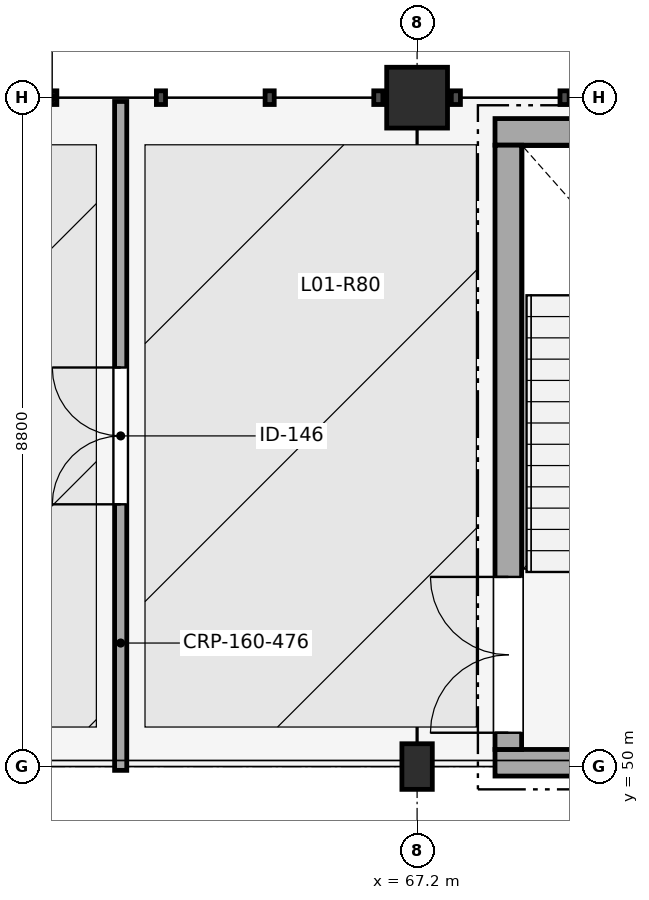
"""IFC4 building model, lengths in metres.
Left out: names, types, materials, properties, quantities, classifications, styles, units other than length and angle.
Written with IfcOpenShell. Run it as: python <this file> out.ifc"""

import sys

from ifc_helpers import new_model, si_unit, direction, frame, frame_2d, origin, origin_2d, place, context, subcontext, project, spatial, rectangle, extrude, element, fill, save


model = new_model("IFC4")
c1 = context("Model", 3, precision=1e-05, world=origin(), true_north=direction((0.0, 1.0)))
c2 = subcontext(c1, "Body", "Model", "MODEL_VIEW")
j1 = project(units=[si_unit("LENGTHUNIT", "METRE"), si_unit("PLANEANGLEUNIT", "RADIAN")], contexts=[c1])
p1 = place(None, origin())
s1 = spatial("IfcSite", under=j1, at=p1, CompositionType="ELEMENT")
p2 = place(p1, origin())
s2 = spatial("IfcBuilding", under=s1, at=p2, CompositionType="ELEMENT")
p3 = place(p2, frame((0.0, 0.0, 4.8)))
s3 = spatial("IfcBuildingStorey", under=s2, at=p3, CompositionType="ELEMENT", Elevation=4.8)
p4 = place(p3, frame((67.2, 50.0, 0.0), z_axis=(0.0, 0.0, 1.0), x_axis=(1.0, 0.0, 0.0)))
e1 = element("IfcColumn", 1, at=p4, inside=s3, PredefinedType="COLUMN", context=c2, shape_type="SweptSolid", body=[
    extrude(rectangle(XDim=0.4, YDim=0.6, at=origin_2d()), origin(), (0.0, 0.0, 1.0), 4.8),
])
p5 = place(p3, frame((67.2, 58.8, 0.0), z_axis=(0.0, 0.0, 1.0), x_axis=(1.0, 0.0, 0.0)))
e2 = element("IfcColumn", 2, at=p5, inside=s3, PredefinedType="COLUMN", context=c2, shape_type="SweptSolid", body=[
    extrude(rectangle(XDim=0.8, YDim=0.8, at=origin_2d()), origin(), (0.0, 0.0, 1.0), 4.8),
])
for number, where, z_axis, x_axis in (
    (3, (73.875, 50.05, 0.0), (0.0, 0.0, 1.0), (-1.0, 0.0, 0.0)),
    (4, (68.225, 58.35, 0.0), (0.0, 0.0, 1.0), (1.0, 0.0, 0.0)),
):
    element("IfcWall", number, at=place(p3, frame(where, z_axis=z_axis, x_axis=x_axis)), inside=s3, PredefinedType="SHEAR", context=c2, shape_type="SweptSolid", body=[
        extrude(rectangle(XDim=5.65, YDim=0.35, at=frame_2d((2.825, 0.0))), origin(), (0.0, 0.0, 1.0), 4.55),
    ])
p6 = place(p3, frame((68.4, 50.225, 0.0), z_axis=(0.0, 0.0, 1.0), x_axis=(0.0, 1.0, 0.0)))
e5 = element("IfcWall", 5, at=p6, inside=s3, PredefinedType="SHEAR", context=c2, shape_type="SweptSolid", body=[
    extrude(rectangle(XDim=7.95, YDim=0.35, at=frame_2d((3.975, 0.0))), origin(), (0.0, 0.0, 1.0), 4.55),
])
p7 = place(p6, frame((0.22, 0.0, 0.0)))
e6 = element("IfcOpeningElement", 6, at=p7, cuts=e5, PredefinedType="OPENING", context=c2, shape_type="SweptSolid", body=[
    extrude(rectangle(XDim=2.05, YDim=2.15, at=frame_2d((1.025, 1.075))), frame((0.0, 0.185, 0.0), z_axis=(0.0, -1.0, 0.0), x_axis=(1.0, 0.0, 0.0)), (0.0, 0.0, 1.0), 0.37),
])
p8 = place(p3, frame((63.3, 49.95, 0.0), z_axis=(0.0, 0.0, 1.0), x_axis=(0.0, 1.0, 0.0)))
e7 = element("IfcWall", 7, at=p8, inside=s3, PredefinedType="PARTITIONING", context=c2, shape_type="SweptSolid", body=[
    extrude(rectangle(XDim=8.8, YDim=0.16, at=frame_2d((4.4, 0.0))), origin(), (0.0, 0.0, 1.0), 4.42),
])
p9 = place(p8, frame((3.5, 0.0, 0.0)))
e8 = element("IfcOpeningElement", 8, at=p9, cuts=e7, PredefinedType="OPENING", context=c2, shape_type="SweptSolid", body=[
    extrude(rectangle(XDim=1.8, YDim=2.15, at=frame_2d((0.9, 1.075))), frame((0.0, 0.09, 0.0), z_axis=(0.0, -1.0, 0.0), x_axis=(1.0, 0.0, 0.0)), (0.0, 0.0, 1.0), 0.18),
])
p10 = place(p7, origin())
e9 = element("IfcDoor", 9, at=p10, inside=s3, OperationType="DOUBLE_DOOR_SINGLE_SWING", PredefinedType="DOOR", context=c2, shape_type="SweptSolid", body=[
    extrude(rectangle(XDim=2.05, YDim=2.15, at=frame_2d((1.025, 1.075))), frame((0.0, 0.025, 0.0), z_axis=(0.0, -1.0, 0.0), x_axis=(1.0, 0.0, 0.0)), (0.0, 0.0, 1.0), 0.05),
])
fill(e6, e9)
p11 = place(p9, origin())
e10 = element("IfcDoor", 10, at=p11, inside=s3, OperationType="DOUBLE_DOOR_SINGLE_SWING", PredefinedType="DOOR", context=c2, shape_type="SweptSolid", body=[
    extrude(rectangle(XDim=1.8, YDim=2.15, at=frame_2d((0.9, 1.075))), frame((0.0, 0.025, 0.0), z_axis=(0.0, -1.0, 0.0), x_axis=(1.0, 0.0, 0.0)), (0.0, 0.0, 1.0), 0.05),
])
fill(e8, e10)
save(model, sys.argv[1])
